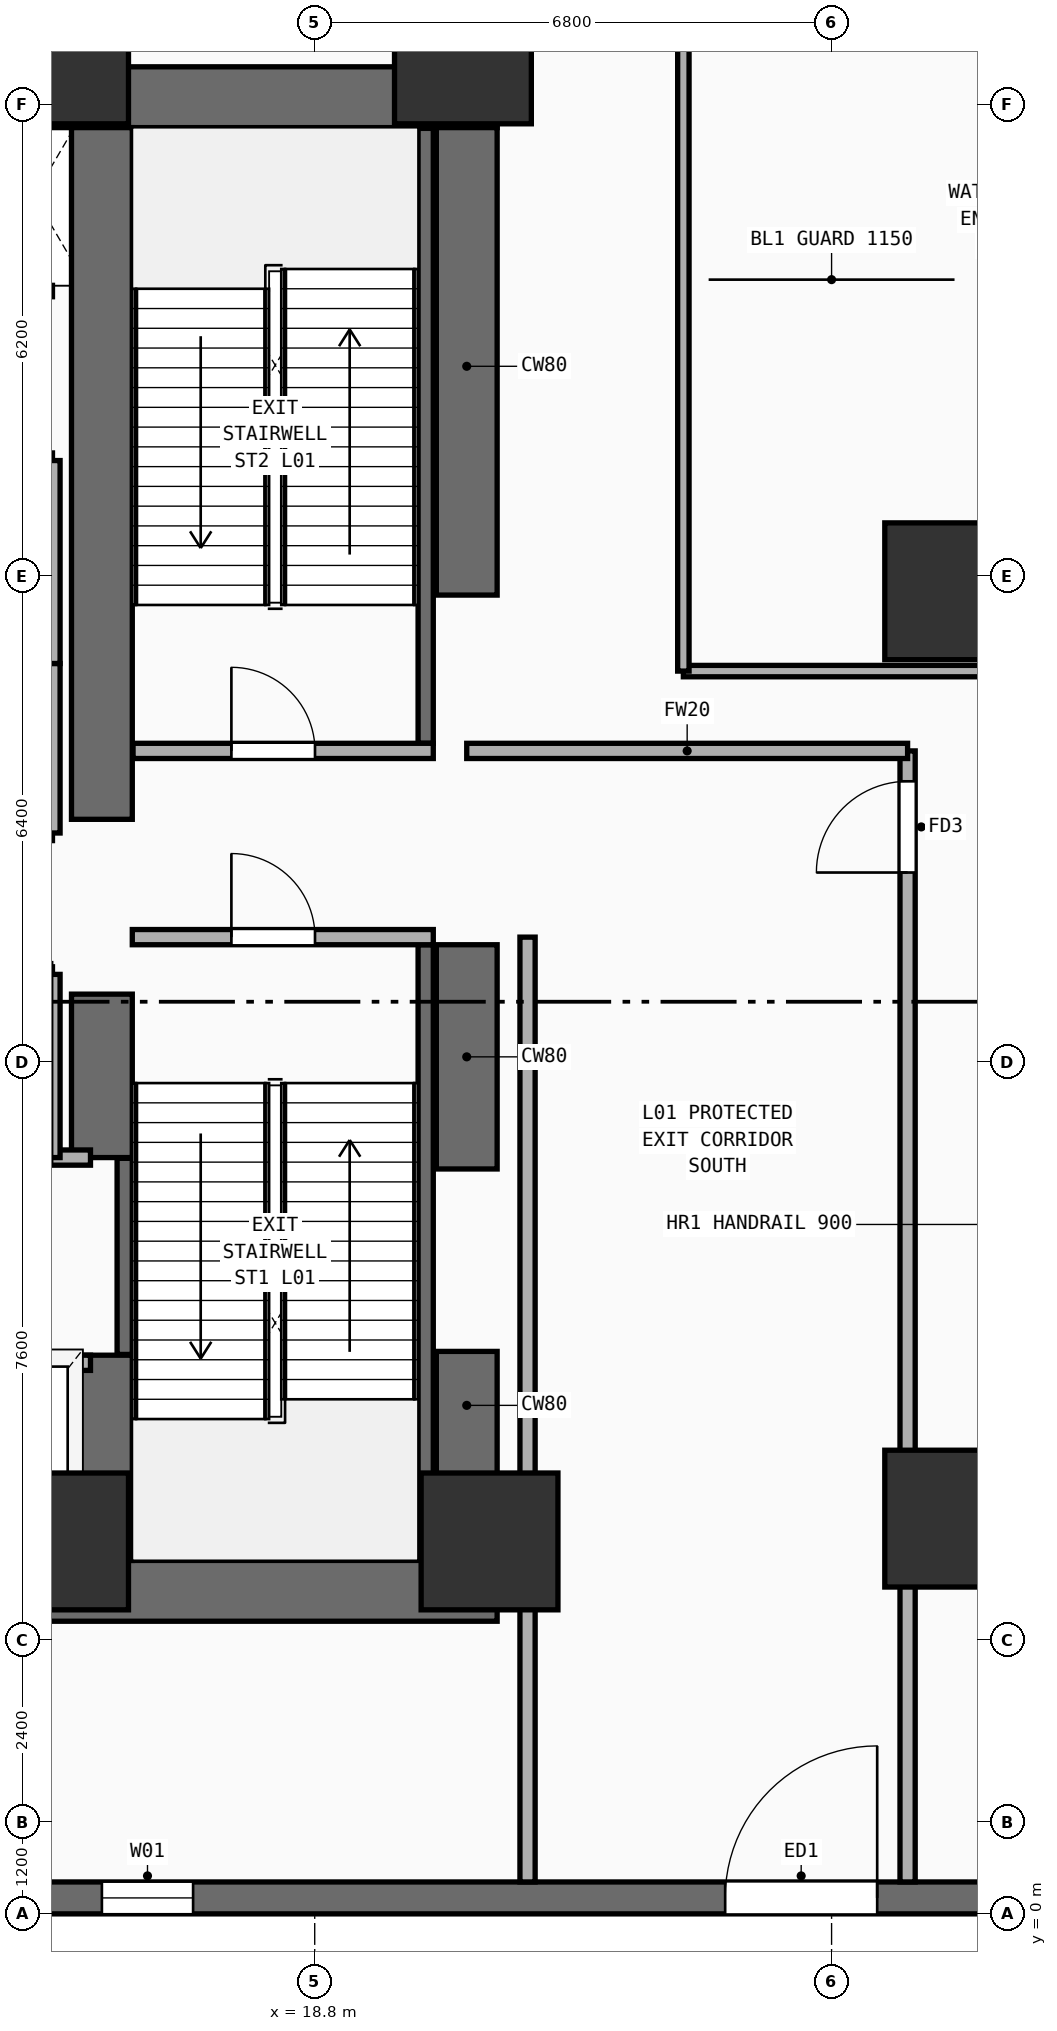
"""IFC4 building model, lengths in metres.
Left out: names, types, materials, properties, quantities, classifications, styles, units other than length and angle.
Written with IfcOpenShell. Run it as: python <this file> out.ifc"""

import sys

from ifc_helpers import new_model, si_unit, direction, frame, frame_2d, origin, origin_2d, place, context, subcontext, project, spatial, rectangle, extrude, element, fill, save


model = new_model("IFC4")
c1 = context("Model", 3, precision=1e-05, world=origin(), true_north=direction((0.0, 1.0)))
c2 = subcontext(c1, "Body", "Model", "MODEL_VIEW")
j1 = project(units=[si_unit("LENGTHUNIT", "METRE"), si_unit("PLANEANGLEUNIT", "RADIAN")], contexts=[c1])
p1 = place(None, origin())
s1 = spatial("IfcSite", under=j1, at=p1, CompositionType="ELEMENT")
p2 = place(p1, origin())
s2 = spatial("IfcBuilding", under=s1, at=p2, CompositionType="ELEMENT")
p3 = place(p2, origin())
s3 = spatial("IfcBuildingStorey", under=s2, at=p3, CompositionType="ELEMENT", Elevation=0.0)
for number, where, z_axis, x_axis in (
    (1, (7.05, 4.25, 0.0), (0.0, 0.0, 1.0), (1.0, 0.0, 0.0)),
    (2, (7.05, 23.9, 0.0), (0.0, 0.0, 1.0), (1.0, 0.0, 0.0)),
):
    element("IfcWall", number, at=place(p3, frame(where, z_axis=z_axis, x_axis=x_axis)), inside=s3, PredefinedType="SHEAR", context=c2, shape_type="SweptSolid", body=[
        extrude(rectangle(XDim=14.15, YDim=0.8, at=frame_2d((7.075, 0.0))), origin(), (0.0, 0.0, 1.0), 5.26),
    ])
p4 = place(p3, frame((20.8, 4.65, 0.0), z_axis=(0.0, 0.0, 1.0), x_axis=(0.0, 1.0, 0.0)))
e3 = element("IfcWall", 3, at=p4, inside=s3, PredefinedType="SHEAR", context=c2, shape_type="SweptSolid", body=[
    extrude(rectangle(XDim=2.75, YDim=0.8, at=frame_2d((1.375, 0.0))), origin(), (0.0, 0.0, 1.0), 5.26),
])
p5 = place(p3, frame((20.8, 9.8, 0.0), z_axis=(0.0, 0.0, 1.0), x_axis=(0.0, 1.0, 0.0)))
e4 = element("IfcWall", 4, at=p5, inside=s3, PredefinedType="SHEAR", context=c2, shape_type="SweptSolid", body=[
    extrude(rectangle(XDim=2.95, YDim=0.8, at=frame_2d((1.475, 0.0))), origin(), (0.0, 0.0, 1.0), 5.26),
])
p6 = place(p3, frame((20.8, 17.35, 0.0), z_axis=(0.0, 0.0, 1.0), x_axis=(0.0, 1.0, 0.0)))
e5 = element("IfcWall", 5, at=p6, inside=s3, PredefinedType="SHEAR", context=c2, shape_type="SweptSolid", body=[
    extrude(rectangle(XDim=6.15, YDim=0.8, at=frame_2d((3.075, 0.0))), origin(), (0.0, 0.0, 1.0), 5.26),
])
p7 = place(p3, frame((16.0, 4.65, 0.0), z_axis=(0.0, 0.0, 1.0), x_axis=(0.0, 1.0, 0.0)))
e6 = element("IfcWall", 6, at=p7, inside=s3, PredefinedType="SHEAR", context=c2, shape_type="SweptSolid", body=[
    extrude(rectangle(XDim=2.7, YDim=0.8, at=frame_2d((1.35, 0.0))), origin(), (0.0, 0.0, 1.0), 5.26),
])
p8 = place(p3, frame((16.0, 9.95, 0.0), z_axis=(0.0, 0.0, 1.0), x_axis=(0.0, 1.0, 0.0)))
e7 = element("IfcWall", 7, at=p8, inside=s3, PredefinedType="SHEAR", context=c2, shape_type="SweptSolid", body=[
    extrude(rectangle(XDim=2.15, YDim=0.8, at=frame_2d((1.075, 0.0))), origin(), (0.0, 0.0, 1.0), 5.26),
])
p9 = place(p3, frame((16.0, 14.4, 0.0), z_axis=(0.0, 0.0, 1.0), x_axis=(0.0, 1.0, 0.0)))
e8 = element("IfcWall", 8, at=p9, inside=s3, PredefinedType="SHEAR", context=c2, shape_type="SweptSolid", body=[
    extrude(rectangle(XDim=9.1, YDim=0.8, at=frame_2d((4.55, 0.0))), origin(), (0.0, 0.0, 1.0), 5.26),
])
for number, where, z_axis, x_axis in (
    (9, (15.45, 4.9, 0.0), (0.0, 0.0, 1.0), (1.0, 0.0, 0.0)),
    (10, (21.1, 4.9, 0.0), (0.0, 0.0, 1.0), (1.0, 0.0, 0.0)),
    (11, (15.45, 24.45, 0.0), (0.0, 0.0, 1.0), (1.0, 0.0, 0.0)),
    (12, (20.75, 24.45, 0.0), (0.0, 0.0, 1.0), (1.0, 0.0, 0.0)),
    (13, (27.2, 5.2, 0.0), (0.0, 0.0, 1.0), (1.0, 0.0, 0.0)),
    (14, (27.2, 17.4, 0.0), (0.0, 0.0, 1.0), (1.0, 0.0, 0.0)),
):
    element("IfcColumn", number, at=place(p3, frame(where, z_axis=z_axis, x_axis=x_axis)), inside=s3, PredefinedType="COLUMN", context=c2, shape_type="SweptSolid", body=[
        extrude(rectangle(XDim=1.8, YDim=1.8, at=origin_2d()), origin(), (0.0, 0.0, 1.0), 5.26),
    ])
p10 = place(p3, frame((0.0, 0.21, 0.0), z_axis=(0.0, 0.0, 1.0), x_axis=(1.0, 0.0, 0.0)))
e15 = element("IfcWall", 15, at=p10, inside=s3, PredefinedType="SOLIDWALL", context=c2, shape_type="SweptSolid", body=[
    extrude(rectangle(XDim=64.8, YDim=0.42, at=frame_2d((32.4, 0.0))), origin(), (0.0, 0.0, 1.0), 5.26),
])
p11 = place(p10, frame((8.0, 0.0, 0.95)))
e16 = element("IfcOpeningElement", 16, at=p11, cuts=e15, PredefinedType="OPENING", context=c2, shape_type="SweptSolid", body=[
    extrude(rectangle(XDim=1.2, YDim=1.6, at=frame_2d((0.6, 0.8))), frame((0.0, 0.22, 0.0), z_axis=(0.0, -1.0, 0.0), x_axis=(1.0, 0.0, 0.0)), (0.0, 0.0, 1.0), 0.44),
])
p12 = place(p10, frame((16.0, 0.0, 0.95)))
e17 = element("IfcOpeningElement", 17, at=p12, cuts=e15, PredefinedType="OPENING", context=c2, shape_type="SweptSolid", body=[
    extrude(rectangle(XDim=1.2, YDim=1.6, at=frame_2d((0.6, 0.8))), frame((0.0, 0.22, 0.0), z_axis=(0.0, -1.0, 0.0), x_axis=(1.0, 0.0, 0.0)), (0.0, 0.0, 1.0), 0.44),
])
p13 = place(p10, frame((34.0, 0.0, 0.95)))
e18 = element("IfcOpeningElement", 18, at=p13, cuts=e15, PredefinedType="OPENING", context=c2, shape_type="SweptSolid", body=[
    extrude(rectangle(XDim=1.2, YDim=1.6, at=frame_2d((0.6, 0.8))), frame((0.0, 0.22, 0.0), z_axis=(0.0, -1.0, 0.0), x_axis=(1.0, 0.0, 0.0)), (0.0, 0.0, 1.0), 0.44),
])
p14 = place(p10, frame((58.0, 0.0, 0.95)))
e19 = element("IfcOpeningElement", 19, at=p14, cuts=e15, PredefinedType="OPENING", context=c2, shape_type="SweptSolid", body=[
    extrude(rectangle(XDim=1.2, YDim=1.6, at=frame_2d((0.6, 0.8))), frame((0.0, 0.22, 0.0), z_axis=(0.0, -1.0, 0.0), x_axis=(1.0, 0.0, 0.0)), (0.0, 0.0, 1.0), 0.44),
])
p15 = place(p10, frame((24.2, 0.0, 0.0)))
e20 = element("IfcOpeningElement", 20, at=p15, cuts=e15, PredefinedType="OPENING", context=c2, shape_type="SweptSolid", body=[
    extrude(rectangle(XDim=2.0, YDim=2.5, at=frame_2d((1.0, 1.25))), frame((0.0, 0.22, 0.0), z_axis=(0.0, -1.0, 0.0), x_axis=(1.0, 0.0, 0.0)), (0.0, 0.0, 1.0), 0.44),
])
p16 = place(p10, frame((45.6, 0.0, 0.0)))
e21 = element("IfcOpeningElement", 21, at=p16, cuts=e15, PredefinedType="OPENING", context=c2, shape_type="SweptSolid", body=[
    extrude(rectangle(XDim=2.4, YDim=2.7, at=frame_2d((1.2, 1.35))), frame((0.0, 0.22, 0.0), z_axis=(0.0, -1.0, 0.0), x_axis=(1.0, 0.0, 0.0)), (0.0, 0.0, 1.0), 0.44),
])
p17 = place(p3, frame((16.3, 7.36, 0.0), z_axis=(0.0, 0.0, 1.0), x_axis=(0.0, 1.0, 0.0)))
e22 = element("IfcWall", 22, at=p17, inside=s3, PredefinedType="SHEAR", context=c2, shape_type="SweptSolid", body=[
    extrude(rectangle(XDim=2.58, YDim=0.2, at=frame_2d((1.29, 0.0))), origin(), (0.0, 0.0, 1.0), 5.26),
])
p18 = place(p3, frame((20.26, 4.66, 0.0), z_axis=(0.0, 0.0, 1.0), x_axis=(0.0, 1.0, 0.0)))
e23 = element("IfcWall", 23, at=p18, inside=s3, PredefinedType="SHEAR", context=c2, shape_type="SweptSolid", body=[
    extrude(rectangle(XDim=8.09, YDim=0.2, at=frame_2d((4.045, 0.0))), origin(), (0.0, 0.0, 1.0), 5.26),
])
p19 = place(p3, frame((16.4, 12.85, 0.0), z_axis=(0.0, 0.0, 1.0), x_axis=(1.0, 0.0, 0.0)))
e24 = element("IfcWall", 24, at=p19, inside=s3, PredefinedType="PARTITIONING", context=c2, shape_type="SweptSolid", body=[
    extrude(rectangle(XDim=3.96, YDim=0.2, at=frame_2d((1.98, 0.0))), origin(), (0.0, 0.0, 1.0), 5.26),
])
p20 = place(p19, frame((1.304, 0.0, 0.0)))
e25 = element("IfcOpeningElement", 25, at=p20, cuts=e24, PredefinedType="OPENING", context=c2, shape_type="SweptSolid", body=[
    extrude(rectangle(XDim=1.1, YDim=2.2, at=frame_2d((0.55, 1.1))), frame((0.0, 0.11, 0.0), z_axis=(0.0, -1.0, 0.0), x_axis=(1.0, 0.0, 0.0)), (0.0, 0.0, 1.0), 0.22),
])
p21 = place(p3, frame((20.26, 15.4, 0.0), z_axis=(0.0, 0.0, 1.0), x_axis=(0.0, 1.0, 0.0)))
e26 = element("IfcWall", 26, at=p21, inside=s3, PredefinedType="SHEAR", context=c2, shape_type="SweptSolid", body=[
    extrude(rectangle(XDim=8.09, YDim=0.2, at=frame_2d((4.045, 0.0))), origin(), (0.0, 0.0, 1.0), 5.26),
])
p22 = place(p3, frame((16.41, 15.3, 0.0), z_axis=(0.0, 0.0, 1.0), x_axis=(1.0, 0.0, 0.0)))
e27 = element("IfcWall", 27, at=p22, inside=s3, PredefinedType="PARTITIONING", context=c2, shape_type="SweptSolid", body=[
    extrude(rectangle(XDim=3.95, YDim=0.2, at=frame_2d((1.975, 0.0))), origin(), (0.0, 0.0, 1.0), 5.26),
])
p23 = place(p22, frame((1.294, 0.0, 0.0)))
e28 = element("IfcOpeningElement", 28, at=p23, cuts=e27, PredefinedType="OPENING", context=c2, shape_type="SweptSolid", body=[
    extrude(rectangle(XDim=1.1, YDim=2.2, at=frame_2d((0.55, 1.1))), frame((0.0, 0.11, 0.0), z_axis=(0.0, -1.0, 0.0), x_axis=(1.0, 0.0, 0.0)), (0.0, 0.0, 1.0), 0.22),
])
p24 = place(p3, frame((7.5, 7.25, 0.0), z_axis=(0.0, 0.0, 1.0), x_axis=(1.0, 0.0, 0.0)))
e29 = element("IfcWall", 29, at=p24, inside=s3, PredefinedType="PARTITIONING", context=c2, shape_type="SweptSolid", body=[
    extrude(rectangle(XDim=8.35, YDim=0.2, at=frame_2d((4.175, 0.0))), origin(), (0.0, 0.0, 1.0), 5.26),
])
p25 = place(p24, frame((0.53, 0.0, 0.0)))
e30 = element("IfcOpeningElement", 30, at=p25, cuts=e29, PredefinedType="OPENING", context=c2, shape_type="SweptSolid", body=[
    extrude(rectangle(XDim=1.1, YDim=2.2, at=frame_2d((0.55, 1.1))), frame((0.0, 0.11, 0.0), z_axis=(0.0, -1.0, 0.0), x_axis=(1.0, 0.0, 0.0)), (0.0, 0.0, 1.0), 0.22),
])
p26 = place(p24, frame((2.37, 0.0, 0.0)))
e31 = element("IfcOpeningElement", 31, at=p26, cuts=e29, PredefinedType="OPENING", context=c2, shape_type="SweptSolid", body=[
    extrude(rectangle(XDim=1.1, YDim=2.2, at=frame_2d((0.55, 1.1))), frame((0.0, 0.11, 0.0), z_axis=(0.0, -1.0, 0.0), x_axis=(1.0, 0.0, 0.0)), (0.0, 0.0, 1.0), 0.22),
])
p27 = place(p24, frame((4.33, 0.0, 0.0)))
e32 = element("IfcOpeningElement", 32, at=p27, cuts=e29, PredefinedType="OPENING", context=c2, shape_type="SweptSolid", body=[
    extrude(rectangle(XDim=1.1, YDim=2.2, at=frame_2d((0.55, 1.1))), frame((0.0, 0.11, 0.0), z_axis=(0.0, -1.0, 0.0), x_axis=(1.0, 0.0, 0.0)), (0.0, 0.0, 1.0), 0.22),
])
p28 = place(p24, frame((6.5, 0.0, 0.0)))
e33 = element("IfcOpeningElement", 33, at=p28, cuts=e29, PredefinedType="OPENING", context=c2, shape_type="SweptSolid", body=[
    extrude(rectangle(XDim=1.1, YDim=2.2, at=frame_2d((0.55, 1.1))), frame((0.0, 0.11, 0.0), z_axis=(0.0, -1.0, 0.0), x_axis=(1.0, 0.0, 0.0)), (0.0, 0.0, 1.0), 0.22),
])
p29 = place(p3, frame((7.5, 9.95, 0.0), z_axis=(0.0, 0.0, 1.0), x_axis=(1.0, 0.0, 0.0)))
e34 = element("IfcWall", 34, at=p29, inside=s3, PredefinedType="PARTITIONING", context=c2, shape_type="SweptSolid", body=[
    extrude(rectangle(XDim=8.35, YDim=0.2, at=frame_2d((4.175, 0.0))), origin(), (0.0, 0.0, 1.0), 5.26),
])
p30 = place(p3, frame((15.35, 9.95, 0.0), z_axis=(0.0, 0.0, 1.0), x_axis=(0.0, 1.0, 0.0)))
e35 = element("IfcWall", 35, at=p30, inside=s3, PredefinedType="PARTITIONING", context=c2, shape_type="SweptSolid", body=[
    extrude(rectangle(XDim=2.41, YDim=0.2, at=frame_2d((1.205, 0.0))), origin(), (0.0, 0.0, 1.0), 5.26),
])
p31 = place(p3, frame((15.35, 14.22, 0.0), z_axis=(0.0, 0.0, 1.0), x_axis=(0.0, 1.0, 0.0)))
e36 = element("IfcWall", 36, at=p31, inside=s3, PredefinedType="PARTITIONING", context=c2, shape_type="SweptSolid", body=[
    extrude(rectangle(XDim=2.23, YDim=0.2, at=frame_2d((1.115, 0.0))), origin(), (0.0, 0.0, 1.0), 5.26),
])
p32 = place(p3, frame((15.35, 16.45, 0.0), z_axis=(0.0, 0.0, 1.0), x_axis=(0.0, 1.0, 0.0)))
e37 = element("IfcWall", 37, at=p32, inside=s3, PredefinedType="PARTITIONING", context=c2, shape_type="SweptSolid", body=[
    extrude(rectangle(XDim=2.67, YDim=0.2, at=frame_2d((1.335, 0.0))), origin(), (0.0, 0.0, 1.0), 5.26),
])
p33 = place(p3, frame((21.6, 0.42, 0.0), z_axis=(0.0, 0.0, 1.0), x_axis=(0.0, 1.0, 0.0)))
e38 = element("IfcWall", 38, at=p33, inside=s3, PredefinedType="PARTITIONING", context=c2, shape_type="SweptSolid", body=[
    extrude(rectangle(XDim=12.43, YDim=0.2, at=frame_2d((6.215, 0.0))), origin(), (0.0, 0.0, 1.0), 5.26),
])
p34 = place(p3, frame((26.6, 0.42, 0.0), z_axis=(0.0, 0.0, 1.0), x_axis=(0.0, 1.0, 0.0)))
e39 = element("IfcWall", 39, at=p34, inside=s3, PredefinedType="PARTITIONING", context=c2, shape_type="SweptSolid", body=[
    extrude(rectangle(XDim=14.88, YDim=0.2, at=frame_2d((7.44, 0.0))), origin(), (0.0, 0.0, 1.0), 5.26),
])
p35 = place(p34, frame((13.28, 0.0, 0.0)))
e40 = element("IfcOpeningElement", 40, at=p35, cuts=e39, PredefinedType="OPENING", context=c2, shape_type="SweptSolid", body=[
    extrude(rectangle(XDim=1.2, YDim=2.25, at=frame_2d((0.6, 1.125))), frame((0.0, 0.11, 0.0), z_axis=(0.0, -1.0, 0.0), x_axis=(1.0, 0.0, 0.0)), (0.0, 0.0, 1.0), 0.22),
])
p36 = place(p3, frame((20.8, 15.3, 0.0), z_axis=(0.0, 0.0, 1.0), x_axis=(1.0, 0.0, 0.0)))
e41 = element("IfcWall", 41, at=p36, inside=s3, PredefinedType="PARTITIONING", context=c2, shape_type="SweptSolid", body=[
    extrude(rectangle(XDim=5.8, YDim=0.2, at=frame_2d((2.9, 0.0))), origin(), (0.0, 0.0, 1.0), 4.76),
])
p37 = place(p3, frame((23.65, 16.35, 0.0), z_axis=(0.0, 0.0, 1.0), x_axis=(1.0, 0.0, 0.0)))
e42 = element("IfcWall", 42, at=p37, inside=s3, PredefinedType="PARTITIONING", context=c2, shape_type="SweptSolid", body=[
    extrude(rectangle(XDim=40.9, YDim=0.15, at=frame_2d((20.45, 0.0))), origin(), (0.0, 0.0, 1.0), 5.26),
])
p38 = place(p37, frame((7.821, 0.0, 0.0)))
e43 = element("IfcOpeningElement", 43, at=p38, cuts=e42, PredefinedType="OPENING", context=c2, shape_type="SweptSolid", body=[
    extrude(rectangle(XDim=1.8, YDim=2.4, at=frame_2d((0.9, 1.2))), frame((0.0, 0.085, 0.0), z_axis=(0.0, -1.0, 0.0), x_axis=(1.0, 0.0, 0.0)), (0.0, 0.0, 1.0), 0.17),
])
p39 = place(p37, frame((23.294, 0.0, 0.0)))
e44 = element("IfcOpeningElement", 44, at=p39, cuts=e42, PredefinedType="OPENING", context=c2, shape_type="SweptSolid", body=[
    extrude(rectangle(XDim=1.8, YDim=2.4, at=frame_2d((0.9, 1.2))), frame((0.0, 0.085, 0.0), z_axis=(0.0, -1.0, 0.0), x_axis=(1.0, 0.0, 0.0)), (0.0, 0.0, 1.0), 0.17),
])
p40 = place(p3, frame((23.65, 16.35, 0.0), z_axis=(0.0, 0.0, 1.0), x_axis=(0.0, 1.0, 0.0)))
e45 = element("IfcWall", 45, at=p40, inside=s3, PredefinedType="PARTITIONING", context=c2, shape_type="SweptSolid", body=[
    extrude(rectangle(XDim=15.05, YDim=0.15, at=frame_2d((7.525, 0.0))), origin(), (0.0, 0.0, 1.0), 5.26),
])
p41 = place(p12, origin())
e46 = element("IfcWindow", 46, at=p41, inside=s3, PartitioningType="SINGLE_PANEL", PredefinedType="WINDOW", context=c2, shape_type="SweptSolid", body=[
    extrude(rectangle(XDim=1.2, YDim=1.6, at=frame_2d((0.6, 0.8))), frame((0.0, 0.03, 0.0), z_axis=(0.0, -1.0, 0.0), x_axis=(1.0, 0.0, 0.0)), (0.0, 0.0, 1.0), 0.06),
])
fill(e17, e46)
p42 = place(p15, frame((2.0, 0.0, 0.0), z_axis=(0.0, 0.0, 1.0), x_axis=(-1.0, 0.0, 0.0)))
e47 = element("IfcDoor", 47, at=p42, inside=s3, OperationType="SINGLE_SWING_LEFT", PredefinedType="DOOR", context=c2, shape_type="SweptSolid", body=[
    extrude(rectangle(XDim=2.0, YDim=2.5, at=frame_2d((1.0, 1.25))), frame((0.0, 0.025, 0.0), z_axis=(0.0, -1.0, 0.0), x_axis=(1.0, 0.0, 0.0)), (0.0, 0.0, 1.0), 0.05),
])
fill(e20, e47)
p43 = place(p20, frame((1.1, 0.0, 0.0), z_axis=(0.0, 0.0, 1.0), x_axis=(-1.0, 0.0, 0.0)))
e48 = element("IfcDoor", 48, at=p43, inside=s3, OperationType="SINGLE_SWING_RIGHT", PredefinedType="DOOR", context=c2, shape_type="SweptSolid", body=[
    extrude(rectangle(XDim=1.1, YDim=2.2, at=frame_2d((0.55, 1.1))), frame((0.0, 0.025, 0.0), z_axis=(0.0, -1.0, 0.0), x_axis=(1.0, 0.0, 0.0)), (0.0, 0.0, 1.0), 0.05),
])
fill(e25, e48)
p44 = place(p23, origin())
e49 = element("IfcDoor", 49, at=p44, inside=s3, OperationType="SINGLE_SWING_LEFT", PredefinedType="DOOR", context=c2, shape_type="SweptSolid", body=[
    extrude(rectangle(XDim=1.1, YDim=2.2, at=frame_2d((0.55, 1.1))), frame((0.0, 0.025, 0.0), z_axis=(0.0, -1.0, 0.0), x_axis=(1.0, 0.0, 0.0)), (0.0, 0.0, 1.0), 0.05),
])
fill(e28, e49)
p45 = place(p35, origin())
e50 = element("IfcDoor", 50, at=p45, inside=s3, OperationType="SINGLE_SWING_LEFT", PredefinedType="DOOR", context=c2, shape_type="SweptSolid", body=[
    extrude(rectangle(XDim=1.2, YDim=2.25, at=frame_2d((0.6, 1.125))), frame((0.0, 0.025, 0.0), z_axis=(0.0, -1.0, 0.0), x_axis=(1.0, 0.0, 0.0)), (0.0, 0.0, 1.0), 0.05),
])
fill(e40, e50)
save(model, sys.argv[1])
